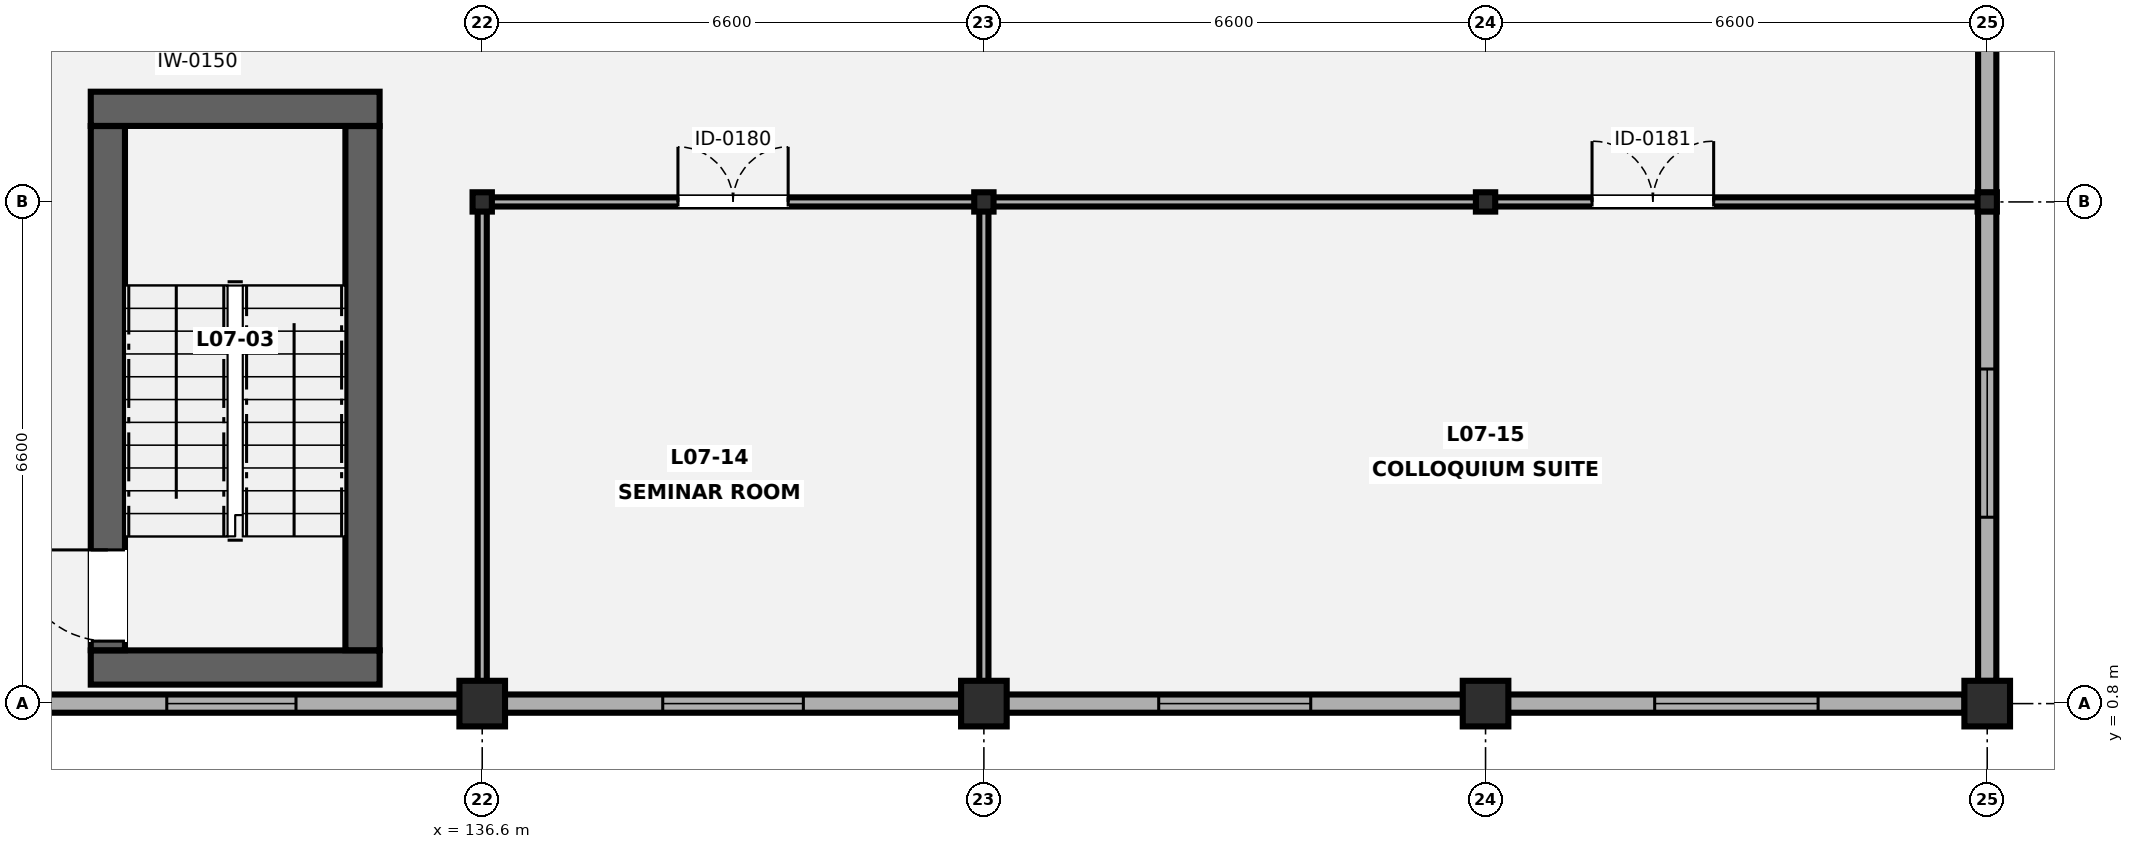
"""IFC4 building model, lengths in metres.
Left out: names, types, materials, properties, quantities, classifications, styles, units other than length and angle.
Written with IfcOpenShell. Run it as: python <this file> out.ifc"""

import sys

from ifc_helpers import new_model, si_unit, direction, frame, frame_2d, origin, origin_2d, place, context, subcontext, project, spatial, rectangle, circle, i_section, extrude, element, fill, save


model = new_model("IFC4")
c1 = context("Model", 3, precision=1e-05, world=origin(), true_north=direction((0.0, 1.0)))
c2 = subcontext(c1, "Body", "Model", "MODEL_VIEW")
j1 = project(units=[si_unit("LENGTHUNIT", "METRE"), si_unit("PLANEANGLEUNIT", "RADIAN")], contexts=[c1])
p1 = place(None, origin())
s1 = spatial("IfcSite", under=j1, at=p1, CompositionType="ELEMENT")
p2 = place(p1, origin())
s2 = spatial("IfcBuilding", under=s1, at=p2, CompositionType="ELEMENT")
p3 = place(p2, frame((0.0, 0.0, 30.1)))
s3 = spatial("IfcBuildingStorey", under=s2, at=p3, CompositionType="ELEMENT", Elevation=30.1)
p4 = place(p3, frame((136.6, 0.8, 0.0), z_axis=(0.0, 0.0, 1.0), x_axis=(1.0, 0.0, 0.0)))
e1 = element("IfcColumn", 1, at=p4, inside=s3, PredefinedType="PILASTER", context=c2, shape_type="SweptSolid", body=[
    extrude(circle(Radius=0.3, at=origin_2d()), origin(), (0.0, 0.0, 1.0), 4.2),
])
p5 = place(p3, frame((136.6, 7.4, 0.0), z_axis=(0.0, 0.0, 1.0), x_axis=(1.0, 0.0, 0.0)))
e2 = element("IfcColumn", 2, at=p5, inside=s3, PredefinedType="COLUMN", context=c2, shape_type="SweptSolid", body=[
    extrude(i_section(OverallWidth=0.254, OverallDepth=0.254, WebThickness=0.009, FlangeThickness=0.014, FilletRadius=0.014, at=origin_2d()), origin(), (0.0, 0.0, 1.0), 4.2),
])
p6 = place(p3, frame((143.2, 0.8, 0.0), z_axis=(0.0, 0.0, 1.0), x_axis=(1.0, 0.0, 0.0)))
e3 = element("IfcColumn", 3, at=p6, inside=s3, PredefinedType="PILASTER", context=c2, shape_type="SweptSolid", body=[
    extrude(circle(Radius=0.3, at=origin_2d()), origin(), (0.0, 0.0, 1.0), 4.2),
])
p7 = place(p3, frame((143.2, 7.4, 0.0), z_axis=(0.0, 0.0, 1.0), x_axis=(1.0, 0.0, 0.0)))
e4 = element("IfcColumn", 4, at=p7, inside=s3, PredefinedType="COLUMN", context=c2, shape_type="SweptSolid", body=[
    extrude(i_section(OverallWidth=0.254, OverallDepth=0.254, WebThickness=0.009, FlangeThickness=0.014, FilletRadius=0.014, at=origin_2d()), origin(), (0.0, 0.0, 1.0), 4.2),
])
p8 = place(p3, frame((149.8, 0.8, 0.0), z_axis=(0.0, 0.0, 1.0), x_axis=(1.0, 0.0, 0.0)))
e5 = element("IfcColumn", 5, at=p8, inside=s3, PredefinedType="PILASTER", context=c2, shape_type="SweptSolid", body=[
    extrude(circle(Radius=0.3, at=origin_2d()), origin(), (0.0, 0.0, 1.0), 4.2),
])
p9 = place(p3, frame((149.8, 7.4, 0.0), z_axis=(0.0, 0.0, 1.0), x_axis=(1.0, 0.0, 0.0)))
e6 = element("IfcColumn", 6, at=p9, inside=s3, PredefinedType="COLUMN", context=c2, shape_type="SweptSolid", body=[
    extrude(i_section(OverallWidth=0.254, OverallDepth=0.254, WebThickness=0.009, FlangeThickness=0.014, FilletRadius=0.014, at=origin_2d()), origin(), (0.0, 0.0, 1.0), 4.2),
])
p10 = place(p3, frame((156.4, 0.8, 0.0), z_axis=(0.0, 0.0, 1.0), x_axis=(1.0, 0.0, 0.0)))
e7 = element("IfcColumn", 7, at=p10, inside=s3, PredefinedType="PILASTER", context=c2, shape_type="SweptSolid", body=[
    extrude(circle(Radius=0.3, at=origin_2d()), origin(), (0.0, 0.0, 1.0), 3.92),
])
p11 = place(p3, frame((156.4, 7.4, 0.0), z_axis=(0.0, 0.0, 1.0), x_axis=(1.0, 0.0, 0.0)))
e8 = element("IfcColumn", 8, at=p11, inside=s3, PredefinedType="COLUMN", context=c2, shape_type="SweptSolid", body=[
    extrude(i_section(OverallWidth=0.254, OverallDepth=0.254, WebThickness=0.009, FlangeThickness=0.014, FilletRadius=0.014, at=origin_2d()), origin(), (0.0, 0.0, 1.0), 3.92),
])
p12 = place(p3, frame((156.4, 20.302, 0.0), z_axis=(0.0, 0.0, 1.0), x_axis=(0.0, -1.0, 0.0)))
e9 = element("IfcWall", 9, at=p12, inside=s3, PredefinedType="SOLIDWALL", context=c2, shape_type="SweptSolid", body=[
    extrude(rectangle(XDim=19.204, YDim=0.24, at=frame_2d((9.602, 0.0))), origin(), (0.0, 0.0, 1.0), 3.372),
])
p13 = place(p12, frame((2.4, 0.0, 0.85)))
e10 = element("IfcOpeningElement", 10, at=p13, cuts=e9, PredefinedType="OPENING", context=c2, shape_type="SweptSolid", body=[
    extrude(rectangle(XDim=1.55, YDim=1.4, at=frame_2d((0.775, 0.7))), frame((0.0, 0.13, 0.0), z_axis=(0.0, -1.0, 0.0), x_axis=(1.0, 0.0, 0.0)), (0.0, 0.0, 1.0), 0.26),
])
p14 = place(p12, frame((15.1, 0.0, 0.85)))
e11 = element("IfcOpeningElement", 11, at=p14, cuts=e9, PredefinedType="OPENING", context=c2, shape_type="SweptSolid", body=[
    extrude(rectangle(XDim=1.95, YDim=1.5, at=frame_2d((0.975, 0.75))), frame((0.0, 0.13, 0.0), z_axis=(0.0, -1.0, 0.0), x_axis=(1.0, 0.0, 0.0)), (0.0, 0.0, 1.0), 0.26),
])
p15 = place(p3, frame((156.102, 0.8, 0.0), z_axis=(0.0, 0.0, 1.0), x_axis=(-1.0, 0.0, 0.0)))
e12 = element("IfcWall", 12, at=p15, inside=s3, PredefinedType="SOLIDWALL", context=c2, shape_type="SweptSolid", body=[
    extrude(rectangle(XDim=52.204, YDim=0.24, at=frame_2d((26.102, 0.0))), origin(), (0.0, 0.0, 1.0), 3.505),
])
p16 = place(p15, frame((48.652, 0.0, 0.85)))
e13 = element("IfcOpeningElement", 13, at=p16, cuts=e12, PredefinedType="OPENING", context=c2, shape_type="SweptSolid", body=[
    extrude(rectangle(XDim=1.1, YDim=1.4, at=frame_2d((0.55, 0.7))), frame((0.0, 0.13, 0.0), z_axis=(0.0, -1.0, 0.0), x_axis=(1.0, 0.0, 0.0)), (0.0, 0.0, 1.0), 0.26),
])
p17 = place(p15, frame((41.977, 0.0, 0.85)))
e14 = element("IfcOpeningElement", 14, at=p17, cuts=e12, PredefinedType="OPENING", context=c2, shape_type="SweptSolid", body=[
    extrude(rectangle(XDim=1.25, YDim=1.4, at=frame_2d((0.625, 0.7))), frame((0.0, 0.13, 0.0), z_axis=(0.0, -1.0, 0.0), x_axis=(1.0, 0.0, 0.0)), (0.0, 0.0, 1.0), 0.26),
])
p18 = place(p15, frame((35.302, 0.0, 0.85)))
e15 = element("IfcOpeningElement", 15, at=p18, cuts=e12, PredefinedType="OPENING", context=c2, shape_type="SweptSolid", body=[
    extrude(rectangle(XDim=1.4, YDim=1.4, at=frame_2d((0.7, 0.7))), frame((0.0, 0.13, 0.0), z_axis=(0.0, -1.0, 0.0), x_axis=(1.0, 0.0, 0.0)), (0.0, 0.0, 1.0), 0.26),
])
p19 = place(p15, frame((28.627, 0.0, 0.85)))
e16 = element("IfcOpeningElement", 16, at=p19, cuts=e12, PredefinedType="OPENING", context=c2, shape_type="SweptSolid", body=[
    extrude(rectangle(XDim=1.55, YDim=1.4, at=frame_2d((0.775, 0.7))), frame((0.0, 0.13, 0.0), z_axis=(0.0, -1.0, 0.0), x_axis=(1.0, 0.0, 0.0)), (0.0, 0.0, 1.0), 0.26),
])
p20 = place(p15, frame((21.952, 0.0, 0.85)))
e17 = element("IfcOpeningElement", 17, at=p20, cuts=e12, PredefinedType="OPENING", context=c2, shape_type="SweptSolid", body=[
    extrude(rectangle(XDim=1.7, YDim=1.4, at=frame_2d((0.85, 0.7))), frame((0.0, 0.13, 0.0), z_axis=(0.0, -1.0, 0.0), x_axis=(1.0, 0.0, 0.0)), (0.0, 0.0, 1.0), 0.26),
])
p21 = place(p15, frame((15.277, 0.0, 0.85)))
e18 = element("IfcOpeningElement", 18, at=p21, cuts=e12, PredefinedType="OPENING", context=c2, shape_type="SweptSolid", body=[
    extrude(rectangle(XDim=1.85, YDim=1.4, at=frame_2d((0.925, 0.7))), frame((0.0, 0.13, 0.0), z_axis=(0.0, -1.0, 0.0), x_axis=(1.0, 0.0, 0.0)), (0.0, 0.0, 1.0), 0.26),
])
p22 = place(p15, frame((8.602, 0.0, 0.85)))
e19 = element("IfcOpeningElement", 19, at=p22, cuts=e12, PredefinedType="OPENING", context=c2, shape_type="SweptSolid", body=[
    extrude(rectangle(XDim=2.0, YDim=1.4, at=frame_2d((1.0, 0.7))), frame((0.0, 0.13, 0.0), z_axis=(0.0, -1.0, 0.0), x_axis=(1.0, 0.0, 0.0)), (0.0, 0.0, 1.0), 0.26),
])
p23 = place(p15, frame((1.927, 0.0, 0.85)))
e20 = element("IfcOpeningElement", 20, at=p23, cuts=e12, PredefinedType="OPENING", context=c2, shape_type="SweptSolid", body=[
    extrude(rectangle(XDim=2.15, YDim=1.4, at=frame_2d((1.075, 0.7))), frame((0.0, 0.13, 0.0), z_axis=(0.0, -1.0, 0.0), x_axis=(1.0, 0.0, 0.0)), (0.0, 0.0, 1.0), 0.26),
])
for number, where, z_axis, x_axis in (
    (21, (131.45, 1.275, 0.0), (0.0, 0.0, 1.0), (1.0, 0.0, 0.0)),
    (22, (131.45, 8.625, 0.0), (0.0, 0.0, 1.0), (1.0, 0.0, 0.0)),
):
    element("IfcWall", number, at=place(p3, frame(where, z_axis=z_axis, x_axis=x_axis)), inside=s3, PredefinedType="SHEAR", context=c2, shape_type="SweptSolid", body=[
        extrude(rectangle(XDim=3.8, YDim=0.45, at=frame_2d((1.9, 0.0))), origin(), (0.0, 0.0, 1.0), 4.02),
    ])
p24 = place(p3, frame((131.675, 1.502, 0.0), z_axis=(0.0, 0.0, 1.0), x_axis=(0.0, 1.0, 0.0)))
e23 = element("IfcWall", 23, at=p24, inside=s3, PredefinedType="SHEAR", context=c2, shape_type="SweptSolid", body=[
    extrude(rectangle(XDim=6.896, YDim=0.45, at=frame_2d((3.448, 0.0))), origin(), (0.0, 0.0, 1.0), 4.02),
])
p25 = place(p24, frame((0.12, 0.0, 0.0)))
e24 = element("IfcOpeningElement", 24, at=p25, cuts=e23, PredefinedType="OPENING", context=c2, shape_type="SweptSolid", body=[
    extrude(rectangle(XDim=1.2, YDim=2.15, at=frame_2d((0.6, 1.075))), frame((0.0, 0.235, 0.0), z_axis=(0.0, -1.0, 0.0), x_axis=(1.0, 0.0, 0.0)), (0.0, 0.0, 1.0), 0.47),
])
p26 = place(p3, frame((135.025, 1.502, 0.0), z_axis=(0.0, 0.0, 1.0), x_axis=(0.0, 1.0, 0.0)))
e25 = element("IfcWall", 25, at=p26, inside=s3, PredefinedType="SHEAR", context=c2, shape_type="SweptSolid", body=[
    extrude(rectangle(XDim=6.896, YDim=0.45, at=frame_2d((3.448, 0.0))), origin(), (0.0, 0.0, 1.0), 4.02),
])
p27 = place(p3, frame((136.6, 7.4, 0.0), z_axis=(0.0, 0.0, 1.0), x_axis=(1.0, 0.0, 0.0)))
e26 = element("IfcWall", 26, at=p27, inside=s3, PredefinedType="PARTITIONING", context=c2, shape_type="SweptSolid", body=[
    extrude(rectangle(XDim=6.6, YDim=0.12, at=frame_2d((3.3, 0.0))), origin(), (0.0, 0.0, 1.0), 3.293),
])
p28 = place(p27, frame((2.575, 0.0, 0.0)))
e27 = element("IfcOpeningElement", 27, at=p28, cuts=e26, PredefinedType="OPENING", context=c2, shape_type="SweptSolid", body=[
    extrude(rectangle(XDim=1.45, YDim=2.12, at=frame_2d((0.725, 1.06))), frame((0.0, 0.07, 0.0), z_axis=(0.0, -1.0, 0.0), x_axis=(1.0, 0.0, 0.0)), (0.0, 0.0, 1.0), 0.14),
])
p29 = place(p3, frame((136.6, 0.8, 0.0), z_axis=(0.0, 0.0, 1.0), x_axis=(0.0, 1.0, 0.0)))
e28 = element("IfcWall", 28, at=p29, inside=s3, PredefinedType="PARTITIONING", context=c2, shape_type="SweptSolid", body=[
    extrude(rectangle(XDim=6.538, YDim=0.12, at=frame_2d((3.269, 0.0))), origin(), (0.0, 0.0, 1.0), 3.372),
])
p30 = place(p3, frame((143.2, 0.8, 0.0), z_axis=(0.0, 0.0, 1.0), x_axis=(0.0, 1.0, 0.0)))
e29 = element("IfcWall", 29, at=p30, inside=s3, PredefinedType="PARTITIONING", context=c2, shape_type="SweptSolid", body=[
    extrude(rectangle(XDim=6.6, YDim=0.12, at=frame_2d((3.3, 0.0))), origin(), (0.0, 0.0, 1.0), 3.372),
])
p31 = place(p3, frame((143.202, 7.4, 0.0), z_axis=(0.0, 0.0, 1.0), x_axis=(1.0, 0.0, 0.0)))
e30 = element("IfcWall", 30, at=p31, inside=s3, PredefinedType="PARTITIONING", context=c2, shape_type="SweptSolid", body=[
    extrude(rectangle(XDim=13.198, YDim=0.12, at=frame_2d((6.599, 0.0))), origin(), (0.0, 0.0, 1.0), 3.293),
])
p32 = place(p31, frame((7.999, 0.0, 0.0)))
e31 = element("IfcOpeningElement", 31, at=p32, cuts=e30, PredefinedType="OPENING", context=c2, shape_type="SweptSolid", body=[
    extrude(rectangle(XDim=1.6, YDim=2.18, at=frame_2d((0.8, 1.09))), frame((0.0, 0.07, 0.0), z_axis=(0.0, -1.0, 0.0), x_axis=(1.0, 0.0, 0.0)), (0.0, 0.0, 1.0), 0.14),
])
p33 = place(p14, origin())
e32 = element("IfcWindow", 32, at=p33, inside=s3, PartitioningType="SINGLE_PANEL", PredefinedType="WINDOW", context=c2, shape_type="SweptSolid", body=[
    extrude(rectangle(XDim=1.95, YDim=1.5, at=frame_2d((0.975, 0.75))), frame((0.0, 0.03, 0.0), z_axis=(0.0, -1.0, 0.0), x_axis=(1.0, 0.0, 0.0)), (0.0, 0.0, 1.0), 0.06),
])
fill(e11, e32)
p34 = place(p20, origin())
e33 = element("IfcWindow", 33, at=p34, inside=s3, PartitioningType="SINGLE_PANEL", PredefinedType="WINDOW", context=c2, shape_type="SweptSolid", body=[
    extrude(rectangle(XDim=1.7, YDim=1.4, at=frame_2d((0.85, 0.7))), frame((0.0, 0.03, 0.0), z_axis=(0.0, -1.0, 0.0), x_axis=(1.0, 0.0, 0.0)), (0.0, 0.0, 1.0), 0.06),
])
fill(e17, e33)
p35 = place(p21, origin())
e34 = element("IfcWindow", 34, at=p35, inside=s3, PartitioningType="SINGLE_PANEL", PredefinedType="WINDOW", context=c2, shape_type="SweptSolid", body=[
    extrude(rectangle(XDim=1.85, YDim=1.4, at=frame_2d((0.925, 0.7))), frame((0.0, 0.03, 0.0), z_axis=(0.0, -1.0, 0.0), x_axis=(1.0, 0.0, 0.0)), (0.0, 0.0, 1.0), 0.06),
])
fill(e18, e34)
p36 = place(p22, origin())
e35 = element("IfcWindow", 35, at=p36, inside=s3, PartitioningType="SINGLE_PANEL", PredefinedType="WINDOW", context=c2, shape_type="SweptSolid", body=[
    extrude(rectangle(XDim=2.0, YDim=1.4, at=frame_2d((1.0, 0.7))), frame((0.0, 0.03, 0.0), z_axis=(0.0, -1.0, 0.0), x_axis=(1.0, 0.0, 0.0)), (0.0, 0.0, 1.0), 0.06),
])
fill(e19, e35)
p37 = place(p23, origin())
e36 = element("IfcWindow", 36, at=p37, inside=s3, PartitioningType="SINGLE_PANEL", PredefinedType="WINDOW", context=c2, shape_type="SweptSolid", body=[
    extrude(rectangle(XDim=2.15, YDim=1.4, at=frame_2d((1.075, 0.7))), frame((0.0, 0.03, 0.0), z_axis=(0.0, -1.0, 0.0), x_axis=(1.0, 0.0, 0.0)), (0.0, 0.0, 1.0), 0.06),
])
fill(e20, e36)
p38 = place(p25, origin())
e37 = element("IfcDoor", 37, at=p38, inside=s3, OperationType="SINGLE_SWING_RIGHT", PredefinedType="DOOR", context=c2, shape_type="SweptSolid", body=[
    extrude(rectangle(XDim=1.2, YDim=2.15, at=frame_2d((0.6, 1.075))), frame((0.0, 0.025, 0.0), z_axis=(0.0, -1.0, 0.0), x_axis=(1.0, 0.0, 0.0)), (0.0, 0.0, 1.0), 0.05),
])
fill(e24, e37)
p39 = place(p28, origin())
e38 = element("IfcDoor", 38, at=p39, inside=s3, OperationType="DOUBLE_DOOR_SINGLE_SWING", PredefinedType="DOOR", context=c2, shape_type="SweptSolid", body=[
    extrude(rectangle(XDim=1.45, YDim=2.12, at=frame_2d((0.725, 1.06))), frame((0.0, 0.025, 0.0), z_axis=(0.0, -1.0, 0.0), x_axis=(1.0, 0.0, 0.0)), (0.0, 0.0, 1.0), 0.05),
])
fill(e27, e38)
p40 = place(p32, origin())
e39 = element("IfcDoor", 39, at=p40, inside=s3, OperationType="DOUBLE_DOOR_SINGLE_SWING", PredefinedType="DOOR", context=c2, shape_type="SweptSolid", body=[
    extrude(rectangle(XDim=1.6, YDim=2.18, at=frame_2d((0.8, 1.09))), frame((0.0, 0.025, 0.0), z_axis=(0.0, -1.0, 0.0), x_axis=(1.0, 0.0, 0.0)), (0.0, 0.0, 1.0), 0.05),
])
fill(e31, e39)
save(model, sys.argv[1])
